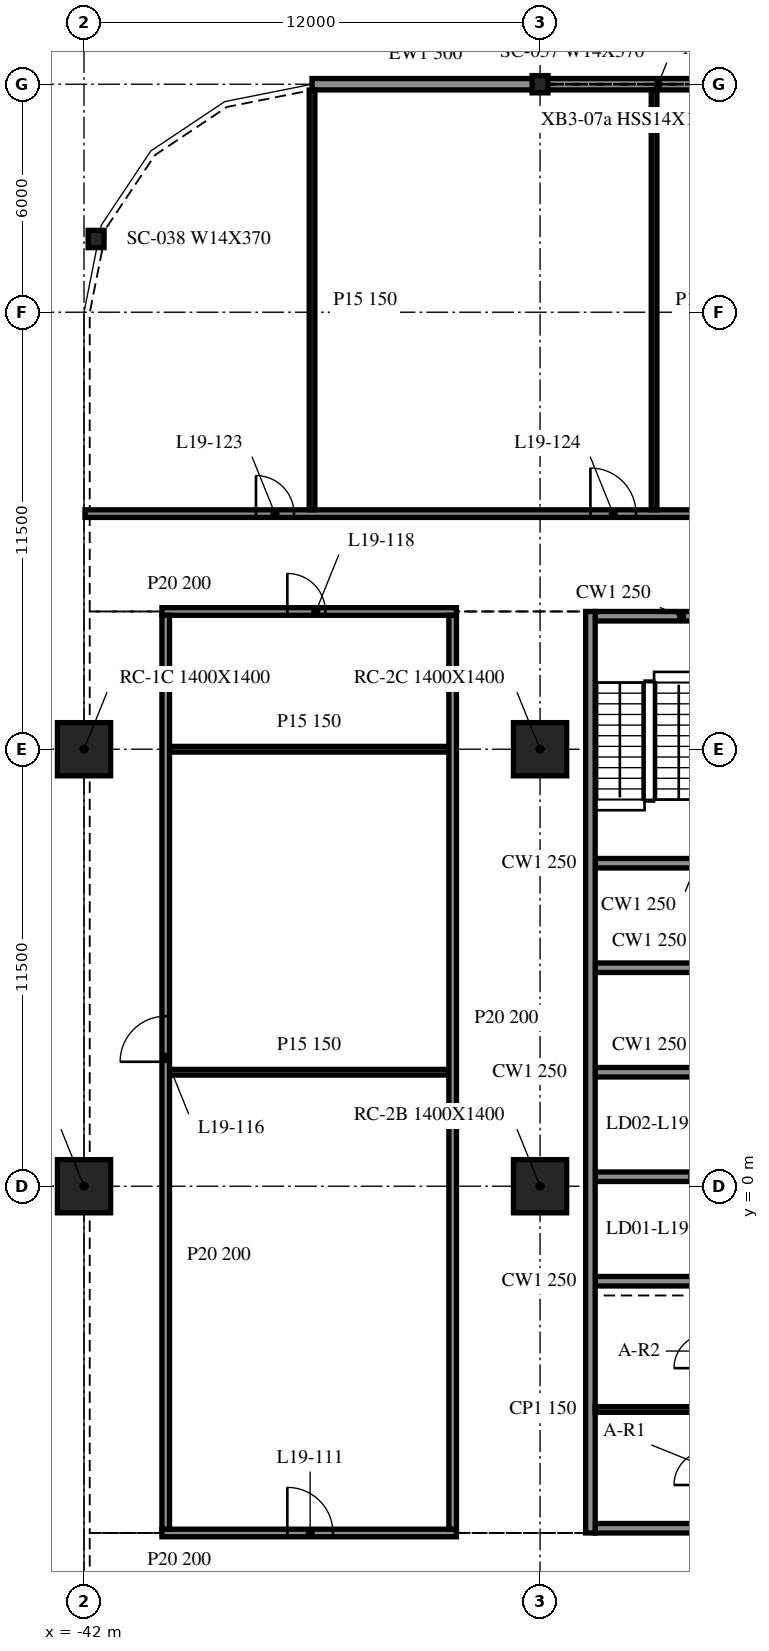
"""IFC4 building model, lengths in metres.
Left out: names, types, materials, properties, quantities, classifications, styles, units other than length and angle.
Written with IfcOpenShell. Run it as: python <this file> out.ifc"""

import sys

from ifc_helpers import new_model, si_unit, direction, frame, frame_2d, origin, origin_2d, place, context, subcontext, project, spatial, rectangle, i_section, extrude, element, fill, save


model = new_model("IFC4")
c1 = context("Model", 3, precision=1e-05, world=origin(), true_north=direction((0.0, 1.0)))
c2 = subcontext(c1, "Body", "Model", "MODEL_VIEW")
j1 = project(units=[si_unit("LENGTHUNIT", "METRE"), si_unit("PLANEANGLEUNIT", "RADIAN")], contexts=[c1])
p1 = place(None, origin())
s1 = spatial("IfcSite", under=j1, at=p1, CompositionType="ELEMENT")
p2 = place(p1, origin())
s2 = spatial("IfcBuilding", under=s1, at=p2, CompositionType="ELEMENT")
p3 = place(p2, frame((0.0, 0.0, 84.8)))
s3 = spatial("IfcBuildingStorey", under=s2, at=p3, CompositionType="ELEMENT", Elevation=84.8)
for number, where, z_axis, x_axis in (
    (1, (-42.0, 0.0, -0.34), (0.0, 0.0, 1.0), (1.0, 0.0, 0.0)),
    (2, (-42.0, 11.5, -0.34), (0.0, 0.0, 1.0), (1.0, 0.0, 0.0)),
    (3, (-30.0, 0.0, -0.34), (0.0, 0.0, 1.0), (1.0, 0.0, 0.0)),
    (4, (-30.0, 11.5, -0.34), (0.0, 0.0, 1.0), (1.0, 0.0, 0.0)),
):
    element("IfcColumn", number, at=place(p3, frame(where, z_axis=z_axis, x_axis=x_axis)), inside=s3, PredefinedType="COLUMN", context=c2, shape_type="SweptSolid", body=[
        extrude(rectangle(XDim=1.4, YDim=1.4, at=origin_2d()), origin(), (0.0, 0.0, 1.0), 4.1),
    ])
for number, where, z_axis, x_axis in (
    (5, (-30.0, 29.0, -0.34), (0.0, 0.0, 1.0), (1.0, 0.0, 0.0)),
    (6, (-41.682, 24.927, -0.34), (0.0, 0.0, 1.0), (1.0, 0.0, 0.0)),
):
    element("IfcColumn", number, at=place(p3, frame(where, z_axis=z_axis, x_axis=x_axis)), inside=s3, PredefinedType="COLUMN", context=c2, shape_type="SweptSolid", body=[
        extrude(i_section(OverallWidth=0.419, OverallDepth=0.455, WebThickness=0.042, FlangeThickness=0.068, at=origin_2d()), origin(), (0.0, 0.0, 1.0), 4.1),
    ])
p4 = place(p3, frame((-18.021, 29.0, 0.0), z_axis=(0.0, 0.0, 1.0), x_axis=(-1.0, 0.0, 0.0)))
e7 = element("IfcWall", 7, at=p4, inside=s3, PredefinedType="NOTDEFINED", context=c2, shape_type="SweptSolid", body=[
    extrude(rectangle(XDim=11.958, YDim=0.3, at=frame_2d((5.979, 0.0))), origin(), (0.0, 0.0, 1.0), 3.003),
])
p5 = place(p3, frame((-30.021, 29.0, 0.0), z_axis=(0.0, 0.0, 1.0), x_axis=(-1.0, 0.0, 0.0)))
e8 = element("IfcWall", 8, at=p5, inside=s3, PredefinedType="NOTDEFINED", context=c2, shape_type="SweptSolid", body=[
    extrude(rectangle(XDim=5.979, YDim=0.3, at=frame_2d((2.99, 0.0))), origin(), (0.0, 0.0, 1.0), 3.003),
])
p6 = place(p3, frame((-28.675, 15.125, 0.0), z_axis=(0.0, 0.0, 1.0), x_axis=(0.0, -1.0, 0.0)))
e9 = element("IfcWall", 9, at=p6, inside=s3, PredefinedType="SOLIDWALL", context=c2, shape_type="SweptSolid", body=[
    extrude(rectangle(XDim=24.25, YDim=0.25, at=frame_2d((12.125, 0.0))), origin(), (0.0, 0.0, 1.0), 3.76),
])
p7 = place(p3, frame((-19.45, -9.0, 0.0), z_axis=(0.0, 0.0, 1.0), x_axis=(-1.0, 0.0, 0.0)))
e10 = element("IfcWall", 10, at=p7, inside=s3, PredefinedType="SOLIDWALL", context=c2, shape_type="SweptSolid", body=[
    extrude(rectangle(XDim=9.1, YDim=0.25, at=frame_2d((4.55, 0.0))), origin(), (0.0, 0.0, 1.0), 3.76),
])
p8 = place(p7, frame((3.65, 0.0, 0.0)))
e11 = element("IfcOpeningElement", 11, at=p8, cuts=e10, PredefinedType="OPENING", context=c2, shape_type="SweptSolid", body=[
    extrude(rectangle(XDim=1.8, YDim=2.1, at=frame_2d((0.9, 1.05))), frame((0.0, 0.135, 0.0), z_axis=(0.0, -1.0, 0.0), x_axis=(1.0, 0.0, 0.0)), (0.0, 0.0, 1.0), 0.27),
])
p9 = place(p3, frame((-28.55, 15.0, 0.0), z_axis=(0.0, 0.0, 1.0), x_axis=(1.0, 0.0, 0.0)))
e12 = element("IfcWall", 12, at=p9, inside=s3, PredefinedType="SOLIDWALL", context=c2, shape_type="SweptSolid", body=[
    extrude(rectangle(XDim=9.1, YDim=0.25, at=frame_2d((4.55, 0.0))), origin(), (0.0, 0.0, 1.0), 3.76),
])
p10 = place(p9, frame((3.65, 0.0, 0.0)))
e13 = element("IfcOpeningElement", 13, at=p10, cuts=e12, PredefinedType="OPENING", context=c2, shape_type="SweptSolid", body=[
    extrude(rectangle(XDim=1.8, YDim=2.1, at=frame_2d((0.9, 1.05))), frame((0.0, 0.135, 0.0), z_axis=(0.0, -1.0, 0.0), x_axis=(1.0, 0.0, 0.0)), (0.0, 0.0, 1.0), 0.27),
])
for number, where, z_axis, x_axis in (
    (14, (-28.55, -2.5, 0.0), (0.0, 0.0, 1.0), (1.0, 0.0, 0.0)),
    (15, (-28.55, 0.25, 0.0), (0.0, 0.0, 1.0), (1.0, 0.0, 0.0)),
    (16, (-28.55, 3.0, 0.0), (0.0, 0.0, 1.0), (1.0, 0.0, 0.0)),
    (17, (-28.55, 5.75, 0.0), (0.0, 0.0, 1.0), (1.0, 0.0, 0.0)),
    (18, (-28.55, 8.5, 0.0), (0.0, 0.0, 1.0), (1.0, 0.0, 0.0)),
):
    element("IfcWall", number, at=place(p3, frame(where, z_axis=z_axis, x_axis=x_axis)), inside=s3, PredefinedType="SOLIDWALL", context=c2, shape_type="SweptSolid", body=[
        extrude(rectangle(XDim=2.85, YDim=0.25, at=frame_2d((1.425, 0.0))), origin(), (0.0, 0.0, 1.0), 3.76),
    ])
p11 = place(p3, frame((-28.55, -5.875, 0.0), z_axis=(0.0, 0.0, 1.0), x_axis=(1.0, 0.0, 0.0)))
e19 = element("IfcWall", 19, at=p11, inside=s3, PredefinedType="PARTITIONING", context=c2, shape_type="SweptSolid", body=[
    extrude(rectangle(XDim=2.85, YDim=0.15, at=frame_2d((1.425, 0.0))), origin(), (0.0, 0.0, 1.0), 3.76),
])
p12 = place(p3, frame((-39.95, -9.125, 0.0), z_axis=(0.0, 0.0, 1.0), x_axis=(1.0, 0.0, 0.0)))
e20 = element("IfcWall", 20, at=p12, inside=s3, PredefinedType="PARTITIONING", context=c2, shape_type="SweptSolid", body=[
    extrude(rectangle(XDim=7.75, YDim=0.2, at=frame_2d((3.875, 0.0))), origin(), (0.0, 0.0, 1.0), 3.76),
])
p13 = place(p12, frame((3.3, 0.0, 0.0)))
e21 = element("IfcOpeningElement", 21, at=p13, cuts=e20, PredefinedType="OPENING", context=c2, shape_type="SweptSolid", body=[
    extrude(rectangle(XDim=1.2, YDim=2.1, at=frame_2d((0.6, 1.05))), frame((0.0, 0.11, 0.0), z_axis=(0.0, -1.0, 0.0), x_axis=(1.0, 0.0, 0.0)), (0.0, 0.0, 1.0), 0.22),
])
for number, where, z_axis, x_axis in (
    (22, (-39.75, 3.0, 0.0), (0.0, 0.0, 1.0), (1.0, 0.0, 0.0)),
    (23, (-39.75, 11.5, 0.0), (0.0, 0.0, 1.0), (1.0, 0.0, 0.0)),
):
    element("IfcWall", number, at=place(p3, frame(where, z_axis=z_axis, x_axis=x_axis)), inside=s3, PredefinedType="PARTITIONING", context=c2, shape_type="SweptSolid", body=[
        extrude(rectangle(XDim=7.35, YDim=0.15, at=frame_2d((3.675, 0.0))), origin(), (0.0, 0.0, 1.0), 3.76),
    ])
p14 = place(p3, frame((-39.95, 15.125, 0.0), z_axis=(0.0, 0.0, 1.0), x_axis=(1.0, 0.0, 0.0)))
e24 = element("IfcWall", 24, at=p14, inside=s3, PredefinedType="PARTITIONING", context=c2, shape_type="SweptSolid", body=[
    extrude(rectangle(XDim=7.75, YDim=0.2, at=frame_2d((3.875, 0.0))), origin(), (0.0, 0.0, 1.0), 3.76),
])
p15 = place(p14, frame((3.3, 0.0, 0.0)))
e25 = element("IfcOpeningElement", 25, at=p15, cuts=e24, PredefinedType="OPENING", context=c2, shape_type="SweptSolid", body=[
    extrude(rectangle(XDim=1.0, YDim=2.1, at=frame_2d((0.5, 1.05))), frame((0.0, 0.11, 0.0), z_axis=(0.0, -1.0, 0.0), x_axis=(1.0, 0.0, 0.0)), (0.0, 0.0, 1.0), 0.22),
])
p16 = place(p3, frame((-41.975, 17.7, 0.0), z_axis=(0.0, 0.0, 1.0), x_axis=(1.0, 0.0, 0.0)))
e26 = element("IfcWall", 26, at=p16, inside=s3, PredefinedType="PARTITIONING", context=c2, shape_type="SweptSolid", body=[
    extrude(rectangle(XDim=95.95, YDim=0.2, at=frame_2d((47.975, 0.0))), origin(), (0.0, 0.0, 1.0), 3.76),
])
p17 = place(p16, frame((4.5, 0.0, 0.0)))
e27 = element("IfcOpeningElement", 27, at=p17, cuts=e26, PredefinedType="OPENING", context=c2, shape_type="SweptSolid", body=[
    extrude(rectangle(XDim=1.0, YDim=2.1, at=frame_2d((0.5, 1.05))), frame((0.0, 0.11, 0.0), z_axis=(0.0, -1.0, 0.0), x_axis=(1.0, 0.0, 0.0)), (0.0, 0.0, 1.0), 0.22),
])
p18 = place(p16, frame((13.3, 0.0, 0.0)))
e28 = element("IfcOpeningElement", 28, at=p18, cuts=e26, PredefinedType="OPENING", context=c2, shape_type="SweptSolid", body=[
    extrude(rectangle(XDim=1.2, YDim=2.1, at=frame_2d((0.6, 1.05))), frame((0.0, 0.11, 0.0), z_axis=(0.0, -1.0, 0.0), x_axis=(1.0, 0.0, 0.0)), (0.0, 0.0, 1.0), 0.22),
])
p19 = place(p16, frame((16.3, 0.0, 0.0)))
e29 = element("IfcOpeningElement", 29, at=p19, cuts=e26, PredefinedType="OPENING", context=c2, shape_type="SweptSolid", body=[
    extrude(rectangle(XDim=1.2, YDim=2.1, at=frame_2d((0.6, 1.05))), frame((0.0, 0.11, 0.0), z_axis=(0.0, -1.0, 0.0), x_axis=(1.0, 0.0, 0.0)), (0.0, 0.0, 1.0), 0.22),
])
p20 = place(p16, frame((22.5, 0.0, 0.0)))
e30 = element("IfcOpeningElement", 30, at=p20, cuts=e26, PredefinedType="OPENING", context=c2, shape_type="SweptSolid", body=[
    extrude(rectangle(XDim=1.0, YDim=2.1, at=frame_2d((0.5, 1.05))), frame((0.0, 0.11, 0.0), z_axis=(0.0, -1.0, 0.0), x_axis=(1.0, 0.0, 0.0)), (0.0, 0.0, 1.0), 0.22),
])
p21 = place(p16, frame((25.3, 0.0, 0.0)))
e31 = element("IfcOpeningElement", 31, at=p21, cuts=e26, PredefinedType="OPENING", context=c2, shape_type="SweptSolid", body=[
    extrude(rectangle(XDim=1.2, YDim=2.1, at=frame_2d((0.6, 1.05))), frame((0.0, 0.11, 0.0), z_axis=(0.0, -1.0, 0.0), x_axis=(1.0, 0.0, 0.0)), (0.0, 0.0, 1.0), 0.22),
])
p22 = place(p16, frame((34.3, 0.0, 0.0)))
e32 = element("IfcOpeningElement", 32, at=p22, cuts=e26, PredefinedType="OPENING", context=c2, shape_type="SweptSolid", body=[
    extrude(rectangle(XDim=1.2, YDim=2.1, at=frame_2d((0.6, 1.05))), frame((0.0, 0.11, 0.0), z_axis=(0.0, -1.0, 0.0), x_axis=(1.0, 0.0, 0.0)), (0.0, 0.0, 1.0), 0.22),
])
p23 = place(p16, frame((42.7, 0.0, 0.0)))
e33 = element("IfcOpeningElement", 33, at=p23, cuts=e26, PredefinedType="OPENING", context=c2, shape_type="SweptSolid", body=[
    extrude(rectangle(XDim=1.0, YDim=2.1, at=frame_2d((0.5, 1.05))), frame((0.0, 0.11, 0.0), z_axis=(0.0, -1.0, 0.0), x_axis=(1.0, 0.0, 0.0)), (0.0, 0.0, 1.0), 0.22),
])
p24 = place(p16, frame((47.3, 0.0, 0.0)))
e34 = element("IfcOpeningElement", 34, at=p24, cuts=e26, PredefinedType="OPENING", context=c2, shape_type="SweptSolid", body=[
    extrude(rectangle(XDim=1.2, YDim=2.1, at=frame_2d((0.6, 1.05))), frame((0.0, 0.11, 0.0), z_axis=(0.0, -1.0, 0.0), x_axis=(1.0, 0.0, 0.0)), (0.0, 0.0, 1.0), 0.22),
])
p25 = place(p16, frame((51.1, 0.0, 0.0)))
e35 = element("IfcOpeningElement", 35, at=p25, cuts=e26, PredefinedType="OPENING", context=c2, shape_type="SweptSolid", body=[
    extrude(rectangle(XDim=1.2, YDim=2.1, at=frame_2d((0.6, 1.05))), frame((0.0, 0.11, 0.0), z_axis=(0.0, -1.0, 0.0), x_axis=(1.0, 0.0, 0.0)), (0.0, 0.0, 1.0), 0.22),
])
p26 = place(p16, frame((54.1, 0.0, 0.0)))
e36 = element("IfcOpeningElement", 36, at=p26, cuts=e26, PredefinedType="OPENING", context=c2, shape_type="SweptSolid", body=[
    extrude(rectangle(XDim=1.0, YDim=2.1, at=frame_2d((0.5, 1.05))), frame((0.0, 0.11, 0.0), z_axis=(0.0, -1.0, 0.0), x_axis=(1.0, 0.0, 0.0)), (0.0, 0.0, 1.0), 0.22),
])
p27 = place(p16, frame((60.1, 0.0, 0.0)))
e37 = element("IfcOpeningElement", 37, at=p27, cuts=e26, PredefinedType="OPENING", context=c2, shape_type="SweptSolid", body=[
    extrude(rectangle(XDim=1.2, YDim=2.1, at=frame_2d((0.6, 1.05))), frame((0.0, 0.11, 0.0), z_axis=(0.0, -1.0, 0.0), x_axis=(1.0, 0.0, 0.0)), (0.0, 0.0, 1.0), 0.22),
])
p28 = place(p16, frame((63.1, 0.0, 0.0)))
e38 = element("IfcOpeningElement", 38, at=p28, cuts=e26, PredefinedType="OPENING", context=c2, shape_type="SweptSolid", body=[
    extrude(rectangle(XDim=1.2, YDim=2.1, at=frame_2d((0.6, 1.05))), frame((0.0, 0.11, 0.0), z_axis=(0.0, -1.0, 0.0), x_axis=(1.0, 0.0, 0.0)), (0.0, 0.0, 1.0), 0.22),
])
p29 = place(p16, frame((72.1, 0.0, 0.0)))
e39 = element("IfcOpeningElement", 39, at=p29, cuts=e26, PredefinedType="OPENING", context=c2, shape_type="SweptSolid", body=[
    extrude(rectangle(XDim=1.0, YDim=2.1, at=frame_2d((0.5, 1.05))), frame((0.0, 0.11, 0.0), z_axis=(0.0, -1.0, 0.0), x_axis=(1.0, 0.0, 0.0)), (0.0, 0.0, 1.0), 0.22),
])
p30 = place(p16, frame((78.1, 0.0, 0.0)))
e40 = element("IfcOpeningElement", 40, at=p30, cuts=e26, PredefinedType="OPENING", context=c2, shape_type="SweptSolid", body=[
    extrude(rectangle(XDim=1.2, YDim=2.1, at=frame_2d((0.6, 1.05))), frame((0.0, 0.11, 0.0), z_axis=(0.0, -1.0, 0.0), x_axis=(1.0, 0.0, 0.0)), (0.0, 0.0, 1.0), 0.22),
])
p31 = place(p16, frame((87.1, 0.0, 0.0)))
e41 = element("IfcOpeningElement", 41, at=p31, cuts=e26, PredefinedType="OPENING", context=c2, shape_type="SweptSolid", body=[
    extrude(rectangle(XDim=1.2, YDim=2.1, at=frame_2d((0.6, 1.05))), frame((0.0, 0.11, 0.0), z_axis=(0.0, -1.0, 0.0), x_axis=(1.0, 0.0, 0.0)), (0.0, 0.0, 1.0), 0.22),
])
p32 = place(p16, frame((90.1, 0.0, 0.0)))
e42 = element("IfcOpeningElement", 42, at=p32, cuts=e26, PredefinedType="OPENING", context=c2, shape_type="SweptSolid", body=[
    extrude(rectangle(XDim=1.0, YDim=2.1, at=frame_2d((0.5, 1.05))), frame((0.0, 0.11, 0.0), z_axis=(0.0, -1.0, 0.0), x_axis=(1.0, 0.0, 0.0)), (0.0, 0.0, 1.0), 0.22),
])
p33 = place(p3, frame((-39.85, -9.025, 0.0), z_axis=(0.0, 0.0, 1.0), x_axis=(0.0, 1.0, 0.0)))
e43 = element("IfcWall", 43, at=p33, inside=s3, PredefinedType="PARTITIONING", context=c2, shape_type="SweptSolid", body=[
    extrude(rectangle(XDim=24.05, YDim=0.2, at=frame_2d((12.025, 0.0))), origin(), (0.0, 0.0, 1.0), 3.76),
])
p34 = place(p33, frame((12.3, 0.0, 0.0)))
e44 = element("IfcOpeningElement", 44, at=p34, cuts=e43, PredefinedType="OPENING", context=c2, shape_type="SweptSolid", body=[
    extrude(rectangle(XDim=1.2, YDim=2.1, at=frame_2d((0.6, 1.05))), frame((0.0, 0.11, 0.0), z_axis=(0.0, -1.0, 0.0), x_axis=(1.0, 0.0, 0.0)), (0.0, 0.0, 1.0), 0.22),
])
p35 = place(p3, frame((-36.0, 17.8, 0.0), z_axis=(0.0, 0.0, 1.0), x_axis=(0.0, 1.0, 0.0)))
e45 = element("IfcWall", 45, at=p35, inside=s3, PredefinedType="PARTITIONING", context=c2, shape_type="SweptSolid", body=[
    extrude(rectangle(XDim=11.047, YDim=0.15, at=frame_2d((5.523, 0.0))), origin(), (0.0, 0.0, 1.0), 3.76),
])
p36 = place(p3, frame((-32.3, -9.025, 0.0), z_axis=(0.0, 0.0, 1.0), x_axis=(0.0, 1.0, 0.0)))
e46 = element("IfcWall", 46, at=p36, inside=s3, PredefinedType="PARTITIONING", context=c2, shape_type="SweptSolid", body=[
    extrude(rectangle(XDim=24.05, YDim=0.2, at=frame_2d((12.025, 0.0))), origin(), (0.0, 0.0, 1.0), 3.76),
])
p37 = place(p3, frame((-27.0, 17.8, 0.0), z_axis=(0.0, 0.0, 1.0), x_axis=(0.0, 1.0, 0.0)))
e47 = element("IfcWall", 47, at=p37, inside=s3, PredefinedType="PARTITIONING", context=c2, shape_type="SweptSolid", body=[
    extrude(rectangle(XDim=11.05, YDim=0.15, at=frame_2d((5.525, 0.0))), origin(), (0.0, 0.0, 1.0), 3.76),
])
p38 = place(p13, origin())
e48 = element("IfcDoor", 48, at=p38, inside=s3, OperationType="SINGLE_SWING_RIGHT", PredefinedType="DOOR", context=c2, shape_type="SweptSolid", body=[
    extrude(rectangle(XDim=1.2, YDim=2.1, at=frame_2d((0.6, 1.05))), frame((0.0, 0.025, 0.0), z_axis=(0.0, -1.0, 0.0), x_axis=(1.0, 0.0, 0.0)), (0.0, 0.0, 1.0), 0.05),
])
fill(e21, e48)
p39 = place(p34, origin())
e49 = element("IfcDoor", 49, at=p39, inside=s3, OperationType="SINGLE_SWING_LEFT", PredefinedType="DOOR", context=c2, shape_type="SweptSolid", body=[
    extrude(rectangle(XDim=1.2, YDim=2.1, at=frame_2d((0.6, 1.05))), frame((0.0, 0.025, 0.0), z_axis=(0.0, -1.0, 0.0), x_axis=(1.0, 0.0, 0.0)), (0.0, 0.0, 1.0), 0.05),
])
fill(e44, e49)
p40 = place(p15, origin())
e50 = element("IfcDoor", 50, at=p40, inside=s3, OperationType="SINGLE_SWING_RIGHT", PredefinedType="DOOR", context=c2, shape_type="SweptSolid", body=[
    extrude(rectangle(XDim=1.0, YDim=2.1, at=frame_2d((0.5, 1.05))), frame((0.0, 0.025, 0.0), z_axis=(0.0, -1.0, 0.0), x_axis=(1.0, 0.0, 0.0)), (0.0, 0.0, 1.0), 0.05),
])
fill(e25, e50)
p41 = place(p17, origin())
e51 = element("IfcDoor", 51, at=p41, inside=s3, OperationType="SINGLE_SWING_LEFT", PredefinedType="DOOR", context=c2, shape_type="SweptSolid", body=[
    extrude(rectangle(XDim=1.0, YDim=2.1, at=frame_2d((0.5, 1.05))), frame((0.0, 0.025, 0.0), z_axis=(0.0, -1.0, 0.0), x_axis=(1.0, 0.0, 0.0)), (0.0, 0.0, 1.0), 0.05),
])
fill(e27, e51)
p42 = place(p18, origin())
e52 = element("IfcDoor", 52, at=p42, inside=s3, OperationType="SINGLE_SWING_LEFT", PredefinedType="DOOR", context=c2, shape_type="SweptSolid", body=[
    extrude(rectangle(XDim=1.2, YDim=2.1, at=frame_2d((0.6, 1.05))), frame((0.0, 0.025, 0.0), z_axis=(0.0, -1.0, 0.0), x_axis=(1.0, 0.0, 0.0)), (0.0, 0.0, 1.0), 0.05),
])
fill(e28, e52)
save(model, sys.argv[1])
